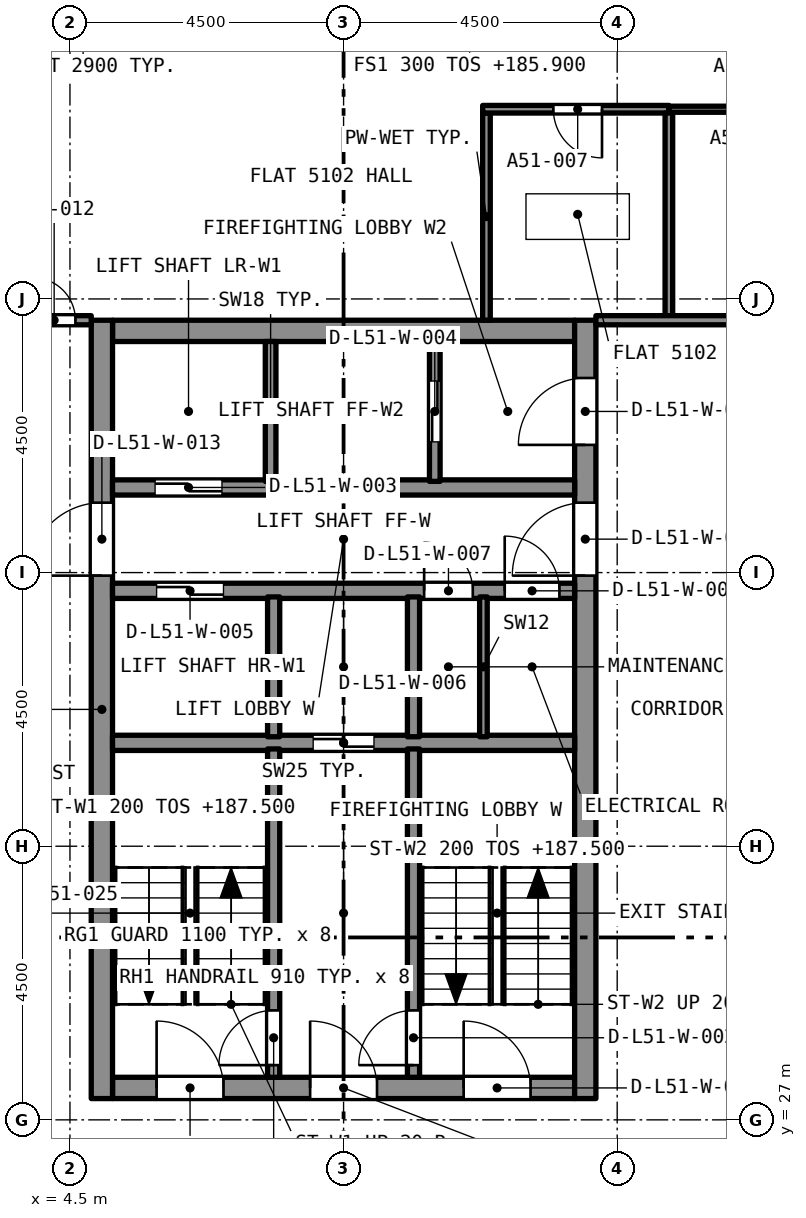
"""IFC4 building model, lengths in metres.
Left out: names, types, materials, properties, quantities, classifications, styles, units other than length and angle.
Written with IfcOpenShell. Run it as: python <this file> out.ifc"""

import sys

from ifc_helpers import new_model, si_unit, direction, frame, frame_2d, origin, place, context, subcontext, project, spatial, rectangle, extrude, element, fill, save


model = new_model("IFC4")
c1 = context("Model", 3, precision=1e-05, world=origin(), true_north=direction((0.0, 1.0)))
c2 = subcontext(c1, "Body", "Model", "MODEL_VIEW")
j1 = project(units=[si_unit("LENGTHUNIT", "METRE"), si_unit("PLANEANGLEUNIT", "RADIAN")], contexts=[c1])
p1 = place(None, origin())
s1 = spatial("IfcSite", under=j1, at=p1, CompositionType="ELEMENT")
p2 = place(p1, origin())
s2 = spatial("IfcBuilding", under=s1, at=p2, CompositionType="ELEMENT")
p3 = place(p2, frame((0.0, 0.0, 185.9)))
s3 = spatial("IfcBuildingStorey", under=s2, at=p3, CompositionType="ELEMENT", Elevation=185.9)
p4 = place(p3, frame((5.2, 27.525, 0.0), z_axis=(0.0, 0.0, 1.0), x_axis=(1.0, 0.0, 0.0)))
e1 = element("IfcWall", 1, at=p4, inside=s3, PredefinedType="SOLIDWALL", context=c2, shape_type="SweptSolid", body=[
    extrude(rectangle(XDim=7.6, YDim=0.35, at=frame_2d((3.8, 0.0))), origin(), (0.0, 0.0, 1.0), 3.2),
])
p5 = place(p4, frame((0.725, 0.0, 0.0)))
e2 = element("IfcOpeningElement", 2, at=p5, cuts=e1, PredefinedType="OPENING", context=c2, shape_type="SweptSolid", body=[
    extrude(rectangle(XDim=1.1, YDim=2.1, at=frame_2d((0.55, 1.05))), frame((0.0, 0.185, 0.0), z_axis=(0.0, -1.0, 0.0), x_axis=(1.0, 0.0, 0.0)), (0.0, 0.0, 1.0), 0.37),
])
p6 = place(p4, frame((3.25, 0.0, 0.0)))
e3 = element("IfcOpeningElement", 3, at=p6, cuts=e1, PredefinedType="OPENING", context=c2, shape_type="SweptSolid", body=[
    extrude(rectangle(XDim=1.1, YDim=2.1, at=frame_2d((0.55, 1.05))), frame((0.0, 0.185, 0.0), z_axis=(0.0, -1.0, 0.0), x_axis=(1.0, 0.0, 0.0)), (0.0, 0.0, 1.0), 0.37),
])
p7 = place(p4, frame((5.775, 0.0, 0.0)))
e4 = element("IfcOpeningElement", 4, at=p7, cuts=e1, PredefinedType="OPENING", context=c2, shape_type="SweptSolid", body=[
    extrude(rectangle(XDim=1.1, YDim=2.1, at=frame_2d((0.55, 1.05))), frame((0.0, 0.185, 0.0), z_axis=(0.0, -1.0, 0.0), x_axis=(1.0, 0.0, 0.0)), (0.0, 0.0, 1.0), 0.37),
])
p8 = place(p3, frame((5.2, 39.975, 0.0), z_axis=(0.0, 0.0, 1.0), x_axis=(1.0, 0.0, 0.0)))
e5 = element("IfcWall", 5, at=p8, inside=s3, PredefinedType="SOLIDWALL", context=c2, shape_type="SweptSolid", body=[
    extrude(rectangle(XDim=7.6, YDim=0.35, at=frame_2d((3.8, 0.0))), origin(), (0.0, 0.0, 1.0), 3.2),
])
p9 = place(p3, frame((5.025, 27.35, 0.0), z_axis=(0.0, 0.0, 1.0), x_axis=(0.0, 1.0, 0.0)))
e6 = element("IfcWall", 6, at=p9, inside=s3, PredefinedType="SOLIDWALL", context=c2, shape_type="SweptSolid", body=[
    extrude(rectangle(XDim=12.8, YDim=0.35, at=frame_2d((6.4, 0.0))), origin(), (0.0, 0.0, 1.0), 3.2),
])
p10 = place(p9, frame((8.6, 0.0, 0.0)))
e7 = element("IfcOpeningElement", 7, at=p10, cuts=e6, PredefinedType="OPENING", context=c2, shape_type="SweptSolid", body=[
    extrude(rectangle(XDim=1.2, YDim=2.1, at=frame_2d((0.6, 1.05))), frame((0.0, 0.185, 0.0), z_axis=(0.0, -1.0, 0.0), x_axis=(1.0, 0.0, 0.0)), (0.0, 0.0, 1.0), 0.37),
])
p11 = place(p3, frame((12.975, 27.35, 0.0), z_axis=(0.0, 0.0, 1.0), x_axis=(0.0, 1.0, 0.0)))
e8 = element("IfcWall", 8, at=p11, inside=s3, PredefinedType="SOLIDWALL", context=c2, shape_type="SweptSolid", body=[
    extrude(rectangle(XDim=12.8, YDim=0.35, at=frame_2d((6.4, 0.0))), origin(), (0.0, 0.0, 1.0), 3.2),
])
p12 = place(p11, frame((10.75, 0.0, 0.0)))
e9 = element("IfcOpeningElement", 9, at=p12, cuts=e8, PredefinedType="OPENING", context=c2, shape_type="SweptSolid", body=[
    extrude(rectangle(XDim=1.1, YDim=2.1, at=frame_2d((0.55, 1.05))), frame((0.0, 0.185, 0.0), z_axis=(0.0, -1.0, 0.0), x_axis=(1.0, 0.0, 0.0)), (0.0, 0.0, 1.0), 0.37),
])
p13 = place(p11, frame((8.6, 0.0, 0.0)))
e10 = element("IfcOpeningElement", 10, at=p13, cuts=e8, PredefinedType="OPENING", context=c2, shape_type="SweptSolid", body=[
    extrude(rectangle(XDim=1.2, YDim=2.1, at=frame_2d((0.6, 1.05))), frame((0.0, 0.185, 0.0), z_axis=(0.0, -1.0, 0.0), x_axis=(1.0, 0.0, 0.0)), (0.0, 0.0, 1.0), 0.37),
])
p14 = place(p3, frame((11.35, 40.15, 0.0), z_axis=(0.0, 0.0, 1.0), x_axis=(0.0, 1.0, 0.0)))
e11 = element("IfcWall", 11, at=p14, inside=s3, PredefinedType="PARTITIONING", context=c2, shape_type="SweptSolid", body=[
    extrude(rectangle(XDim=3.408, YDim=0.125, at=frame_2d((1.704, 0.0))), origin(), (0.0, 0.0, 1.0), 2.9),
])
p15 = place(p3, frame((14.35, 43.62, 0.0), z_axis=(0.0, 0.0, 1.0), x_axis=(-1.0, 0.0, 0.0)))
e12 = element("IfcWall", 12, at=p15, inside=s3, PredefinedType="PARTITIONING", context=c2, shape_type="SweptSolid", body=[
    extrude(rectangle(XDim=3.063, YDim=0.125, at=frame_2d((1.531, 0.0))), origin(), (0.0, 0.0, 1.0), 2.9),
])
p16 = place(p15, frame((1.1, 0.0, 0.0)))
e13 = element("IfcOpeningElement", 13, at=p16, cuts=e12, PredefinedType="OPENING", context=c2, shape_type="SweptSolid", body=[
    extrude(rectangle(XDim=0.8, YDim=2.1, at=frame_2d((0.4, 1.05))), frame((0.0, 0.073, 0.0), z_axis=(0.0, -1.0, 0.0), x_axis=(1.0, 0.0, 0.0)), (0.0, 0.0, 1.0), 0.145),
])
p17 = place(p3, frame((14.35, 40.225, 0.0), z_axis=(0.0, 0.0, 1.0), x_axis=(0.0, 1.0, 0.0)))
e14 = element("IfcWall", 14, at=p17, inside=s3, PredefinedType="PARTITIONING", context=c2, shape_type="SweptSolid", body=[
    extrude(rectangle(XDim=3.333, YDim=0.125, at=frame_2d((1.666, 0.0))), origin(), (0.0, 0.0, 1.0), 2.9),
])
p18 = place(p3, frame((13.15, 40.15, 0.0), z_axis=(0.0, 0.0, 1.0), x_axis=(1.0, 0.0, 0.0)))
e15 = element("IfcWall", 15, at=p18, inside=s3, PredefinedType="PARTITIONING", context=c2, shape_type="SweptSolid", body=[
    extrude(rectangle(XDim=4.45, YDim=0.15, at=frame_2d((2.225, 0.0))), origin(), (0.0, 0.0, 1.0), 2.9),
])
p19 = place(p3, frame((17.875, 43.62, 0.0), z_axis=(0.0, 0.0, 1.0), x_axis=(-1.0, 0.0, 0.0)))
e16 = element("IfcWall", 16, at=p19, inside=s3, PredefinedType="PARTITIONING", context=c2, shape_type="SweptSolid", body=[
    extrude(rectangle(XDim=3.525, YDim=0.1, at=frame_2d((1.762, 0.0))), origin(), (0.0, 0.0, 1.0), 2.9),
])
p20 = place(p19, frame((1.25, 0.0, 0.0)))
e17 = element("IfcOpeningElement", 17, at=p20, cuts=e16, PredefinedType="OPENING", context=c2, shape_type="SweptSolid", body=[
    extrude(rectangle(XDim=0.9, YDim=2.1, at=frame_2d((0.45, 1.05))), frame((0.0, 0.06, 0.0), z_axis=(0.0, -1.0, 0.0), x_axis=(1.0, 0.0, 0.0)), (0.0, 0.0, 1.0), 0.12),
])
p21 = place(p3, frame((3.65, 40.15, 0.0), z_axis=(0.0, 0.0, 1.0), x_axis=(1.0, 0.0, 0.0)))
e18 = element("IfcWall", 18, at=p21, inside=s3, PredefinedType="PARTITIONING", context=c2, shape_type="SweptSolid", body=[
    extrude(rectangle(XDim=1.2, YDim=0.15, at=frame_2d((0.6, 0.0))), origin(), (0.0, 0.0, 1.0), 2.9),
])
p22 = place(p21, frame((0.24, 0.0, 0.0)))
e19 = element("IfcOpeningElement", 19, at=p22, cuts=e18, PredefinedType="OPENING", context=c2, shape_type="SweptSolid", body=[
    extrude(rectangle(XDim=0.7, YDim=2.1, at=frame_2d((0.35, 1.05))), frame((0.0, 0.085, 0.0), z_axis=(0.0, -1.0, 0.0), x_axis=(1.0, 0.0, 0.0)), (0.0, 0.0, 1.0), 0.17),
])
p23 = place(p3, frame((5.2, 33.2, 0.0), z_axis=(0.0, 0.0, 1.0), x_axis=(1.0, 0.0, 0.0)))
e20 = element("IfcWall", 20, at=p23, inside=s3, PredefinedType="SOLIDWALL", context=c2, shape_type="SweptSolid", body=[
    extrude(rectangle(XDim=7.6, YDim=0.25, at=frame_2d((3.8, 0.0))), origin(), (0.0, 0.0, 1.0), 2.9),
])
p24 = place(p23, frame((3.3, 0.0, 0.0)))
e21 = element("IfcOpeningElement", 21, at=p24, cuts=e20, PredefinedType="OPENING", context=c2, shape_type="SweptSolid", body=[
    extrude(rectangle(XDim=1.0, YDim=2.1, at=frame_2d((0.5, 1.05))), frame((0.0, 0.135, 0.0), z_axis=(0.0, -1.0, 0.0), x_axis=(1.0, 0.0, 0.0)), (0.0, 0.0, 1.0), 0.27),
])
p25 = place(p3, frame((5.2, 35.7, 0.0), z_axis=(0.0, 0.0, 1.0), x_axis=(1.0, 0.0, 0.0)))
e22 = element("IfcWall", 22, at=p25, inside=s3, PredefinedType="SOLIDWALL", context=c2, shape_type="SweptSolid", body=[
    extrude(rectangle(XDim=7.6, YDim=0.25, at=frame_2d((3.8, 0.0))), origin(), (0.0, 0.0, 1.0), 2.9),
])
p26 = place(p25, frame((0.725, 0.0, 0.0)))
e23 = element("IfcOpeningElement", 23, at=p26, cuts=e22, PredefinedType="OPENING", context=c2, shape_type="SweptSolid", body=[
    extrude(rectangle(XDim=1.1, YDim=2.4, at=frame_2d((0.55, 1.2))), frame((0.0, 0.135, 0.0), z_axis=(0.0, -1.0, 0.0), x_axis=(1.0, 0.0, 0.0)), (0.0, 0.0, 1.0), 0.27),
])
p27 = place(p25, frame((5.125, 0.0, 0.0)))
e24 = element("IfcOpeningElement", 24, at=p27, cuts=e22, PredefinedType="OPENING", context=c2, shape_type="SweptSolid", body=[
    extrude(rectangle(XDim=0.8, YDim=2.1, at=frame_2d((0.4, 1.05))), frame((0.0, 0.135, 0.0), z_axis=(0.0, -1.0, 0.0), x_axis=(1.0, 0.0, 0.0)), (0.0, 0.0, 1.0), 0.27),
])
p28 = place(p25, frame((6.45, 0.0, 0.0)))
e25 = element("IfcOpeningElement", 25, at=p28, cuts=e22, PredefinedType="OPENING", context=c2, shape_type="SweptSolid", body=[
    extrude(rectangle(XDim=0.9, YDim=2.1, at=frame_2d((0.45, 1.05))), frame((0.0, 0.135, 0.0), z_axis=(0.0, -1.0, 0.0), x_axis=(1.0, 0.0, 0.0)), (0.0, 0.0, 1.0), 0.27),
])
p29 = place(p3, frame((5.2, 37.4, 0.0), z_axis=(0.0, 0.0, 1.0), x_axis=(1.0, 0.0, 0.0)))
e26 = element("IfcWall", 26, at=p29, inside=s3, PredefinedType="SOLIDWALL", context=c2, shape_type="SweptSolid", body=[
    extrude(rectangle(XDim=7.6, YDim=0.25, at=frame_2d((3.8, 0.0))), origin(), (0.0, 0.0, 1.0), 2.9),
])
p30 = place(p29, frame((0.7, 0.0, 0.0)))
e27 = element("IfcOpeningElement", 27, at=p30, cuts=e26, PredefinedType="OPENING", context=c2, shape_type="SweptSolid", body=[
    extrude(rectangle(XDim=1.1, YDim=2.4, at=frame_2d((0.55, 1.2))), frame((0.0, 0.135, 0.0), z_axis=(0.0, -1.0, 0.0), x_axis=(1.0, 0.0, 0.0)), (0.0, 0.0, 1.0), 0.27),
])
p31 = place(p3, frame((7.85, 27.7, 0.0), z_axis=(0.0, 0.0, 1.0), x_axis=(0.0, 1.0, 0.0)))
e28 = element("IfcWall", 28, at=p31, inside=s3, PredefinedType="SOLIDWALL", context=c2, shape_type="SweptSolid", body=[
    extrude(rectangle(XDim=5.4, YDim=0.2, at=frame_2d((2.7, 0.0))), origin(), (0.0, 0.0, 1.0), 2.9),
])
p32 = place(p31, frame((0.2, 0.0, 0.0)))
e29 = element("IfcOpeningElement", 29, at=p32, cuts=e28, PredefinedType="OPENING", context=c2, shape_type="SweptSolid", body=[
    extrude(rectangle(XDim=0.9, YDim=2.1, at=frame_2d((0.45, 1.05))), frame((0.0, 0.11, 0.0), z_axis=(0.0, -1.0, 0.0), x_axis=(1.0, 0.0, 0.0)), (0.0, 0.0, 1.0), 0.22),
])
p33 = place(p3, frame((10.15, 27.7, 0.0), z_axis=(0.0, 0.0, 1.0), x_axis=(0.0, 1.0, 0.0)))
e30 = element("IfcWall", 30, at=p33, inside=s3, PredefinedType="SOLIDWALL", context=c2, shape_type="SweptSolid", body=[
    extrude(rectangle(XDim=5.4, YDim=0.2, at=frame_2d((2.7, 0.0))), origin(), (0.0, 0.0, 1.0), 2.9),
])
p34 = place(p33, frame((0.2, 0.0, 0.0)))
e31 = element("IfcOpeningElement", 31, at=p34, cuts=e30, PredefinedType="OPENING", context=c2, shape_type="SweptSolid", body=[
    extrude(rectangle(XDim=0.9, YDim=2.1, at=frame_2d((0.45, 1.05))), frame((0.0, 0.11, 0.0), z_axis=(0.0, -1.0, 0.0), x_axis=(1.0, 0.0, 0.0)), (0.0, 0.0, 1.0), 0.22),
])
for number, where, z_axis, x_axis in (
    (32, (7.85, 33.3, 0.0), (0.0, 0.0, 1.0), (0.0, 1.0, 0.0)),
    (33, (10.15, 33.3, 0.0), (0.0, 0.0, 1.0), (0.0, 1.0, 0.0)),
):
    element("IfcWall", number, at=place(p3, frame(where, z_axis=z_axis, x_axis=x_axis)), inside=s3, PredefinedType="SOLIDWALL", context=c2, shape_type="SweptSolid", body=[
        extrude(rectangle(XDim=2.3, YDim=0.2, at=frame_2d((1.15, 0.0))), origin(), (0.0, 0.0, 1.0), 2.9),
    ])
p35 = place(p3, frame((7.8, 37.5, 0.0), z_axis=(0.0, 0.0, 1.0), x_axis=(0.0, 1.0, 0.0)))
e34 = element("IfcWall", 34, at=p35, inside=s3, PredefinedType="SOLIDWALL", context=c2, shape_type="SweptSolid", body=[
    extrude(rectangle(XDim=2.3, YDim=0.175, at=frame_2d((1.15, 0.0))), origin(), (0.0, 0.0, 1.0), 2.9),
])
p36 = place(p3, frame((10.5, 37.5, 0.0), z_axis=(0.0, 0.0, 1.0), x_axis=(0.0, 1.0, 0.0)))
e35 = element("IfcWall", 35, at=p36, inside=s3, PredefinedType="SOLIDWALL", context=c2, shape_type="SweptSolid", body=[
    extrude(rectangle(XDim=2.3, YDim=0.175, at=frame_2d((1.15, 0.0))), origin(), (0.0, 0.0, 1.0), 2.9),
])
p37 = place(p36, frame((0.65, 0.0, 0.0)))
e36 = element("IfcOpeningElement", 36, at=p37, cuts=e35, PredefinedType="OPENING", context=c2, shape_type="SweptSolid", body=[
    extrude(rectangle(XDim=1.0, YDim=2.1, at=frame_2d((0.5, 1.05))), frame((0.0, 0.097, 0.0), z_axis=(0.0, -1.0, 0.0), x_axis=(1.0, 0.0, 0.0)), (0.0, 0.0, 1.0), 0.195),
])
p38 = place(p3, frame((11.3, 33.3, 0.0), z_axis=(0.0, 0.0, 1.0), x_axis=(0.0, 1.0, 0.0)))
e37 = element("IfcWall", 37, at=p38, inside=s3, PredefinedType="PARTITIONING", context=c2, shape_type="SweptSolid", body=[
    extrude(rectangle(XDim=2.3, YDim=0.125, at=frame_2d((1.15, 0.0))), origin(), (0.0, 0.0, 1.0), 2.9),
])
p39 = place(p16, origin())
e38 = element("IfcDoor", 38, at=p39, inside=s3, OperationType="SINGLE_SWING_LEFT", PredefinedType="DOOR", context=c2, shape_type="SweptSolid", body=[
    extrude(rectangle(XDim=0.8, YDim=2.1, at=frame_2d((0.4, 1.05))), frame((0.0, 0.025, 0.0), z_axis=(0.0, -1.0, 0.0), x_axis=(1.0, 0.0, 0.0)), (0.0, 0.0, 1.0), 0.05),
])
fill(e13, e38)
p40 = place(p22, origin())
e39 = element("IfcDoor", 39, at=p40, inside=s3, OperationType="SINGLE_SWING_LEFT", PredefinedType="DOOR", context=c2, shape_type="SweptSolid", body=[
    extrude(rectangle(XDim=0.7, YDim=2.1, at=frame_2d((0.35, 1.05))), frame((0.0, 0.025, 0.0), z_axis=(0.0, -1.0, 0.0), x_axis=(1.0, 0.0, 0.0)), (0.0, 0.0, 1.0), 0.05),
])
fill(e19, e39)
p41 = place(p32, origin())
e40 = element("IfcDoor", 40, at=p41, inside=s3, OperationType="SINGLE_SWING_LEFT", PredefinedType="DOOR", context=c2, shape_type="SweptSolid", body=[
    extrude(rectangle(XDim=0.9, YDim=2.1, at=frame_2d((0.45, 1.05))), frame((0.0, 0.025, 0.0), z_axis=(0.0, -1.0, 0.0), x_axis=(1.0, 0.0, 0.0)), (0.0, 0.0, 1.0), 0.05),
])
fill(e29, e40)
p42 = place(p34, origin())
e41 = element("IfcDoor", 41, at=p42, inside=s3, OperationType="SINGLE_SWING_LEFT", PredefinedType="DOOR", context=c2, shape_type="SweptSolid", body=[
    extrude(rectangle(XDim=0.9, YDim=2.1, at=frame_2d((0.45, 1.05))), frame((0.0, 0.025, 0.0), z_axis=(0.0, -1.0, 0.0), x_axis=(1.0, 0.0, 0.0)), (0.0, 0.0, 1.0), 0.05),
])
fill(e31, e41)
p43 = place(p30, origin())
e42 = element("IfcDoor", 42, at=p43, inside=s3, OperationType="SLIDING_TO_LEFT", PredefinedType="DOOR", context=c2, shape_type="SweptSolid", body=[
    extrude(rectangle(XDim=1.1, YDim=2.4, at=frame_2d((0.55, 1.2))), frame((0.0, 0.025, 0.0), z_axis=(0.0, -1.0, 0.0), x_axis=(1.0, 0.0, 0.0)), (0.0, 0.0, 1.0), 0.05),
])
fill(e27, e42)
p44 = place(p37, origin())
e43 = element("IfcDoor", 43, at=p44, inside=s3, OperationType="SLIDING_TO_LEFT", PredefinedType="DOOR", context=c2, shape_type="SweptSolid", body=[
    extrude(rectangle(XDim=1.0, YDim=2.1, at=frame_2d((0.5, 1.05))), frame((0.0, 0.025, 0.0), z_axis=(0.0, -1.0, 0.0), x_axis=(1.0, 0.0, 0.0)), (0.0, 0.0, 1.0), 0.05),
])
fill(e36, e43)
p45 = place(p26, origin())
e44 = element("IfcDoor", 44, at=p45, inside=s3, OperationType="SLIDING_TO_LEFT", PredefinedType="DOOR", context=c2, shape_type="SweptSolid", body=[
    extrude(rectangle(XDim=1.1, YDim=2.4, at=frame_2d((0.55, 1.2))), frame((0.0, 0.025, 0.0), z_axis=(0.0, -1.0, 0.0), x_axis=(1.0, 0.0, 0.0)), (0.0, 0.0, 1.0), 0.05),
])
fill(e23, e44)
p46 = place(p24, origin())
e45 = element("IfcDoor", 45, at=p46, inside=s3, OperationType="SLIDING_TO_LEFT", PredefinedType="DOOR", context=c2, shape_type="SweptSolid", body=[
    extrude(rectangle(XDim=1.0, YDim=2.1, at=frame_2d((0.5, 1.05))), frame((0.0, 0.025, 0.0), z_axis=(0.0, -1.0, 0.0), x_axis=(1.0, 0.0, 0.0)), (0.0, 0.0, 1.0), 0.05),
])
fill(e21, e45)
p47 = place(p27, origin())
e46 = element("IfcDoor", 46, at=p47, inside=s3, OperationType="SINGLE_SWING_LEFT", PredefinedType="DOOR", context=c2, shape_type="SweptSolid", body=[
    extrude(rectangle(XDim=0.8, YDim=2.1, at=frame_2d((0.4, 1.05))), frame((0.0, 0.025, 0.0), z_axis=(0.0, -1.0, 0.0), x_axis=(1.0, 0.0, 0.0)), (0.0, 0.0, 1.0), 0.05),
])
fill(e24, e46)
p48 = place(p28, origin())
e47 = element("IfcDoor", 47, at=p48, inside=s3, OperationType="SINGLE_SWING_LEFT", PredefinedType="DOOR", context=c2, shape_type="SweptSolid", body=[
    extrude(rectangle(XDim=0.9, YDim=2.1, at=frame_2d((0.45, 1.05))), frame((0.0, 0.025, 0.0), z_axis=(0.0, -1.0, 0.0), x_axis=(1.0, 0.0, 0.0)), (0.0, 0.0, 1.0), 0.05),
])
fill(e25, e47)
p49 = place(p5, origin())
e48 = element("IfcDoor", 48, at=p49, inside=s3, OperationType="SINGLE_SWING_LEFT", PredefinedType="DOOR", context=c2, shape_type="SweptSolid", body=[
    extrude(rectangle(XDim=1.1, YDim=2.1, at=frame_2d((0.55, 1.05))), frame((0.0, 0.025, 0.0), z_axis=(0.0, -1.0, 0.0), x_axis=(1.0, 0.0, 0.0)), (0.0, 0.0, 1.0), 0.05),
])
fill(e2, e48)
p50 = place(p6, origin())
e49 = element("IfcDoor", 49, at=p50, inside=s3, OperationType="SINGLE_SWING_LEFT", PredefinedType="DOOR", context=c2, shape_type="SweptSolid", body=[
    extrude(rectangle(XDim=1.1, YDim=2.1, at=frame_2d((0.55, 1.05))), frame((0.0, 0.025, 0.0), z_axis=(0.0, -1.0, 0.0), x_axis=(1.0, 0.0, 0.0)), (0.0, 0.0, 1.0), 0.05),
])
fill(e3, e49)
p51 = place(p7, origin())
e50 = element("IfcDoor", 50, at=p51, inside=s3, OperationType="SINGLE_SWING_LEFT", PredefinedType="DOOR", context=c2, shape_type="SweptSolid", body=[
    extrude(rectangle(XDim=1.1, YDim=2.1, at=frame_2d((0.55, 1.05))), frame((0.0, 0.025, 0.0), z_axis=(0.0, -1.0, 0.0), x_axis=(1.0, 0.0, 0.0)), (0.0, 0.0, 1.0), 0.05),
])
fill(e4, e50)
p52 = place(p12, origin())
e51 = element("IfcDoor", 51, at=p52, inside=s3, OperationType="SINGLE_SWING_LEFT", PredefinedType="DOOR", context=c2, shape_type="SweptSolid", body=[
    extrude(rectangle(XDim=1.1, YDim=2.1, at=frame_2d((0.55, 1.05))), frame((0.0, 0.025, 0.0), z_axis=(0.0, -1.0, 0.0), x_axis=(1.0, 0.0, 0.0)), (0.0, 0.0, 1.0), 0.05),
])
fill(e9, e51)
p53 = place(p10, origin())
e52 = element("IfcDoor", 52, at=p53, inside=s3, OperationType="SINGLE_SWING_LEFT", PredefinedType="DOOR", context=c2, shape_type="SweptSolid", body=[
    extrude(rectangle(XDim=1.2, YDim=2.1, at=frame_2d((0.6, 1.05))), frame((0.0, 0.025, 0.0), z_axis=(0.0, -1.0, 0.0), x_axis=(1.0, 0.0, 0.0)), (0.0, 0.0, 1.0), 0.05),
])
fill(e7, e52)
p54 = place(p13, origin())
e53 = element("IfcDoor", 53, at=p54, inside=s3, OperationType="SINGLE_SWING_LEFT", PredefinedType="DOOR", context=c2, shape_type="SweptSolid", body=[
    extrude(rectangle(XDim=1.2, YDim=2.1, at=frame_2d((0.6, 1.05))), frame((0.0, 0.025, 0.0), z_axis=(0.0, -1.0, 0.0), x_axis=(1.0, 0.0, 0.0)), (0.0, 0.0, 1.0), 0.05),
])
fill(e10, e53)
save(model, sys.argv[1])
